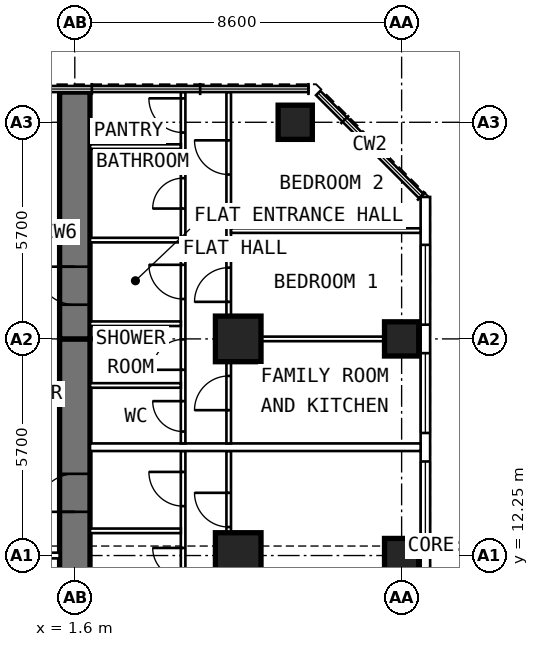
"""IFC4 building model, lengths in metres.
Left out: names, types, materials, properties, quantities, classifications, styles, units other than length and angle.
Written with IfcOpenShell. Run it as: python <this file> out.ifc"""

import sys

from ifc_helpers import new_model, si_unit, direction, frame, frame_2d, origin, origin_2d, place, context, subcontext, project, spatial, rectangle, extrude, element, fill, save


model = new_model("IFC4")
c1 = context("Model", 3, precision=1e-05, world=origin(), true_north=direction((0.0, 1.0)))
c2 = subcontext(c1, "Body", "Model", "MODEL_VIEW")
j1 = project(units=[si_unit("LENGTHUNIT", "METRE"), si_unit("PLANEANGLEUNIT", "RADIAN")], contexts=[c1])
p1 = place(None, origin())
s1 = spatial("IfcSite", under=j1, at=p1, CompositionType="ELEMENT")
p2 = place(p1, origin())
s2 = spatial("IfcBuilding", under=s1, at=p2, CompositionType="ELEMENT")
p3 = place(p2, frame((0.0, 0.0, 172.4)))
s3 = spatial("IfcBuildingStorey", under=s2, at=p3, CompositionType="ELEMENT", Elevation=172.4)
for number, where, z_axis, x_axis in (
    (1, (10.2, 12.25, 0.0), (0.0, 0.0, 1.0), (0.0, 1.0, 0.0)),
    (2, (10.2, 17.95, 0.0), (0.0, 0.0, 1.0), (0.0, 1.0, 0.0)),
    (3, (7.4, 23.65, 0.0), (0.0, 0.0, 1.0), (0.0, 1.0, 0.0)),
):
    element("IfcColumn", number, at=place(p3, frame(where, z_axis=z_axis, x_axis=x_axis)), inside=s3, PredefinedType="COLUMN", context=c2, shape_type="SweptSolid", body=[
        extrude(rectangle(XDim=0.9, YDim=0.9, at=origin_2d()), origin(), (0.0, 0.0, 1.0), 3.6),
    ])
for number, where, z_axis, x_axis in (
    (4, (5.9, 12.25, 0.0), (0.0, 0.0, 1.0), (0.0, 1.0, 0.0)),
    (5, (5.9, 17.95, 0.0), (0.0, 0.0, 1.0), (0.0, 1.0, 0.0)),
):
    element("IfcColumn", number, at=place(p3, frame(where, z_axis=z_axis, x_axis=x_axis)), inside=s3, PredefinedType="COLUMN", context=c2, shape_type="SweptSolid", body=[
        extrude(rectangle(XDim=1.2, YDim=1.2, at=origin_2d()), origin(), (0.0, 0.0, 1.0), 3.6),
    ])
p4 = place(p3, frame((1.6, 9.6, 0.0), z_axis=(0.0, 0.0, 1.0), x_axis=(0.0, 1.0, 0.0)))
e6 = element("IfcWall", 6, at=p4, inside=s3, PredefinedType="SHEAR", context=c2, shape_type="SweptSolid", body=[
    extrude(rectangle(XDim=8.35, YDim=0.8, at=frame_2d((4.175, 0.0))), origin(), (0.0, 0.0, 1.0), 3.6),
])
p5 = place(p4, frame((3.8, 0.0, 0.0)))
e7 = element("IfcOpeningElement", 7, at=p5, cuts=e6, PredefinedType="OPENING", context=c2, shape_type="SweptSolid", body=[
    extrude(rectangle(XDim=1.0, YDim=2.1, at=frame_2d((0.5, 1.05))), frame((0.0, 0.412, 0.0), z_axis=(0.0, -1.0, 0.0), x_axis=(1.0, 0.0, 0.0)), (0.0, 0.0, 1.0), 0.824),
])
p6 = place(p3, frame((1.6, 17.95, 0.0), z_axis=(0.0, 0.0, 1.0), x_axis=(0.0, 1.0, 0.0)))
e8 = element("IfcWall", 8, at=p6, inside=s3, PredefinedType="SHEAR", context=c2, shape_type="SweptSolid", body=[
    extrude(rectangle(XDim=6.495, YDim=0.8, at=frame_2d((3.248, 0.0))), origin(), (0.0, 0.0, 1.0), 3.6),
])
p7 = place(p6, frame((0.9, 0.0, 0.0)))
e9 = element("IfcOpeningElement", 9, at=p7, cuts=e8, PredefinedType="OPENING", context=c2, shape_type="SweptSolid", body=[
    extrude(rectangle(XDim=1.0, YDim=2.1, at=frame_2d((0.5, 1.05))), frame((0.0, 0.412, 0.0), z_axis=(0.0, -1.0, 0.0), x_axis=(1.0, 0.0, 0.0)), (0.0, 0.0, 1.0), 0.824),
])
p8 = place(p3, frame((10.825, 6.409, 0.0), z_axis=(0.0, 0.0, 1.0), x_axis=(0.0, 1.0, 0.0)))
e10 = element("IfcWall", 10, at=p8, inside=s3, PredefinedType="SOLIDWALL", context=c2, shape_type="SweptSolid", body=[
    extrude(rectangle(XDim=15.276, YDim=0.25, at=frame_2d((7.638, 0.0))), origin(), (0.0, 0.0, 1.0), 3.35),
])
p9 = place(p8, frame((0.516, 0.0, 0.8)))
e11 = element("IfcOpeningElement", 11, at=p9, cuts=e10, PredefinedType="OPENING", context=c2, shape_type="SweptSolid", body=[
    extrude(rectangle(XDim=2.1, YDim=1.8, at=frame_2d((1.05, 0.9))), frame((0.0, 0.137, 0.0), z_axis=(0.0, -1.0, 0.0), x_axis=(1.0, 0.0, 0.0)), (0.0, 0.0, 1.0), 0.274),
])
p10 = place(p8, frame((3.366, 0.0, 0.8)))
e12 = element("IfcOpeningElement", 12, at=p10, cuts=e10, PredefinedType="OPENING", context=c2, shape_type="SweptSolid", body=[
    extrude(rectangle(XDim=2.1, YDim=1.8, at=frame_2d((1.05, 0.9))), frame((0.0, 0.137, 0.0), z_axis=(0.0, -1.0, 0.0), x_axis=(1.0, 0.0, 0.0)), (0.0, 0.0, 1.0), 0.274),
])
p11 = place(p8, frame((6.216, 0.0, 0.8)))
e13 = element("IfcOpeningElement", 13, at=p11, cuts=e10, PredefinedType="OPENING", context=c2, shape_type="SweptSolid", body=[
    extrude(rectangle(XDim=2.1, YDim=1.8, at=frame_2d((1.05, 0.9))), frame((0.0, 0.137, 0.0), z_axis=(0.0, -1.0, 0.0), x_axis=(1.0, 0.0, 0.0)), (0.0, 0.0, 1.0), 0.274),
])
p12 = place(p8, frame((9.066, 0.0, 0.8)))
e14 = element("IfcOpeningElement", 14, at=p12, cuts=e10, PredefinedType="OPENING", context=c2, shape_type="SweptSolid", body=[
    extrude(rectangle(XDim=2.1, YDim=1.8, at=frame_2d((1.05, 0.9))), frame((0.0, 0.137, 0.0), z_axis=(0.0, -1.0, 0.0), x_axis=(1.0, 0.0, 0.0)), (0.0, 0.0, 1.0), 0.274),
])
p13 = place(p8, frame((11.916, 0.0, 0.8)))
e15 = element("IfcOpeningElement", 15, at=p13, cuts=e10, PredefinedType="OPENING", context=c2, shape_type="SweptSolid", body=[
    extrude(rectangle(XDim=2.1, YDim=1.8, at=frame_2d((1.05, 0.9))), frame((0.0, 0.137, 0.0), z_axis=(0.0, -1.0, 0.0), x_axis=(1.0, 0.0, 0.0)), (0.0, 0.0, 1.0), 0.274),
])
p14 = place(p3, frame((4.45, 10.05, 0.0), z_axis=(0.0, 0.0, 1.0), x_axis=(0.0, 1.0, 0.0)))
e16 = element("IfcWall", 16, at=p14, inside=s3, PredefinedType="PARTITIONING", context=c2, shape_type="SweptSolid", body=[
    extrude(rectangle(XDim=4.95, YDim=0.12, at=frame_2d((2.475, 0.0))), origin(), (0.0, 0.0, 1.0), 3.35),
])
p15 = place(p14, frame((1.6, 0.0, 0.0)))
e17 = element("IfcOpeningElement", 17, at=p15, cuts=e16, PredefinedType="OPENING", context=c2, shape_type="SweptSolid", body=[
    extrude(rectangle(XDim=0.8, YDim=2.1, at=frame_2d((0.4, 1.05))), frame((0.0, 0.072, 0.0), z_axis=(0.0, -1.0, 0.0), x_axis=(1.0, 0.0, 0.0)), (0.0, 0.0, 1.0), 0.144),
])
p16 = place(p14, frame((3.5, 0.0, 0.0)))
e18 = element("IfcOpeningElement", 18, at=p16, cuts=e16, PredefinedType="OPENING", context=c2, shape_type="SweptSolid", body=[
    extrude(rectangle(XDim=0.9, YDim=2.1, at=frame_2d((0.45, 1.05))), frame((0.0, 0.072, 0.0), z_axis=(0.0, -1.0, 0.0), x_axis=(1.0, 0.0, 0.0)), (0.0, 0.0, 1.0), 0.144),
])
p17 = place(p3, frame((5.65, 9.6, 0.0), z_axis=(0.0, 0.0, 1.0), x_axis=(0.0, 1.0, 0.0)))
e19 = element("IfcWall", 19, at=p17, inside=s3, PredefinedType="PARTITIONING", context=c2, shape_type="SweptSolid", body=[
    extrude(rectangle(XDim=5.4, YDim=0.12, at=frame_2d((2.7, 0.0))), origin(), (0.0, 0.0, 1.0), 3.35),
])
p18 = place(p17, frame((3.4, 0.0, 0.0)))
e20 = element("IfcOpeningElement", 20, at=p18, cuts=e19, PredefinedType="OPENING", context=c2, shape_type="SweptSolid", body=[
    extrude(rectangle(XDim=0.9, YDim=2.1, at=frame_2d((0.45, 1.05))), frame((0.0, 0.072, 0.0), z_axis=(0.0, -1.0, 0.0), x_axis=(1.0, 0.0, 0.0)), (0.0, 0.0, 1.0), 0.144),
])
p19 = place(p3, frame((2.0, 12.9, 0.0), z_axis=(0.0, 0.0, 1.0), x_axis=(1.0, 0.0, 0.0)))
e21 = element("IfcWall", 21, at=p19, inside=s3, PredefinedType="PARTITIONING", context=c2, shape_type="SweptSolid", body=[
    extrude(rectangle(XDim=2.39, YDim=0.12, at=frame_2d((1.195, 0.0))), origin(), (0.0, 0.0, 1.0), 3.35),
])
p20 = place(p3, frame((4.45, 15.2, 0.0), z_axis=(0.0, 0.0, 1.0), x_axis=(0.0, 1.0, 0.0)))
e22 = element("IfcWall", 22, at=p20, inside=s3, PredefinedType="PARTITIONING", context=c2, shape_type="SweptSolid", body=[
    extrude(rectangle(XDim=9.245, YDim=0.12, at=frame_2d((4.623, 0.0))), origin(), (0.0, 0.0, 1.0), 3.35),
])
p21 = place(p20, frame((0.312, 0.0, 0.0)))
e23 = element("IfcOpeningElement", 23, at=p21, cuts=e22, PredefinedType="OPENING", context=c2, shape_type="SweptSolid", body=[
    extrude(rectangle(XDim=0.8, YDim=2.1, at=frame_2d((0.4, 1.05))), frame((0.0, 0.072, 0.0), z_axis=(0.0, -1.0, 0.0), x_axis=(1.0, 0.0, 0.0)), (0.0, 0.0, 1.0), 0.144),
])
p22 = place(p20, frame((1.938, 0.0, 0.0)))
e24 = element("IfcOpeningElement", 24, at=p22, cuts=e22, PredefinedType="OPENING", context=c2, shape_type="SweptSolid", body=[
    extrude(rectangle(XDim=0.8, YDim=2.1, at=frame_2d((0.4, 1.05))), frame((0.0, 0.072, 0.0), z_axis=(0.0, -1.0, 0.0), x_axis=(1.0, 0.0, 0.0)), (0.0, 0.0, 1.0), 0.144),
])
p23 = place(p20, frame((3.8, 0.0, 0.0)))
e25 = element("IfcOpeningElement", 25, at=p23, cuts=e22, PredefinedType="OPENING", context=c2, shape_type="SweptSolid", body=[
    extrude(rectangle(XDim=0.9, YDim=2.1, at=frame_2d((0.45, 1.05))), frame((0.0, 0.072, 0.0), z_axis=(0.0, -1.0, 0.0), x_axis=(1.0, 0.0, 0.0)), (0.0, 0.0, 1.0), 0.144),
])
p24 = place(p20, frame((6.18, 0.0, 0.0)))
e26 = element("IfcOpeningElement", 26, at=p24, cuts=e22, PredefinedType="OPENING", context=c2, shape_type="SweptSolid", body=[
    extrude(rectangle(XDim=0.8, YDim=2.1, at=frame_2d((0.4, 1.05))), frame((0.0, 0.072, 0.0), z_axis=(0.0, -1.0, 0.0), x_axis=(1.0, 0.0, 0.0)), (0.0, 0.0, 1.0), 0.144),
])
p25 = place(p20, frame((8.18, 0.0, 0.0)))
e27 = element("IfcOpeningElement", 27, at=p25, cuts=e22, PredefinedType="OPENING", context=c2, shape_type="SweptSolid", body=[
    extrude(rectangle(XDim=0.9, YDim=2.1, at=frame_2d((0.45, 1.05))), frame((0.0, 0.072, 0.0), z_axis=(0.0, -1.0, 0.0), x_axis=(1.0, 0.0, 0.0)), (0.0, 0.0, 1.0), 0.144),
])
p26 = place(p3, frame((5.65, 15.2, 0.0), z_axis=(0.0, 0.0, 1.0), x_axis=(0.0, 1.0, 0.0)))
e28 = element("IfcWall", 28, at=p26, inside=s3, PredefinedType="PARTITIONING", context=c2, shape_type="SweptSolid", body=[
    extrude(rectangle(XDim=9.245, YDim=0.12, at=frame_2d((4.623, 0.0))), origin(), (0.0, 0.0, 1.0), 3.35),
])
p27 = place(p26, frame((0.875, 0.0, 0.0)))
e29 = element("IfcOpeningElement", 29, at=p27, cuts=e28, PredefinedType="OPENING", context=c2, shape_type="SweptSolid", body=[
    extrude(rectangle(XDim=0.9, YDim=2.1, at=frame_2d((0.45, 1.05))), frame((0.0, 0.072, 0.0), z_axis=(0.0, -1.0, 0.0), x_axis=(1.0, 0.0, 0.0)), (0.0, 0.0, 1.0), 0.144),
])
p28 = place(p26, frame((3.725, 0.0, 0.0)))
e30 = element("IfcOpeningElement", 30, at=p28, cuts=e28, PredefinedType="OPENING", context=c2, shape_type="SweptSolid", body=[
    extrude(rectangle(XDim=0.9, YDim=2.1, at=frame_2d((0.45, 1.05))), frame((0.0, 0.072, 0.0), z_axis=(0.0, -1.0, 0.0), x_axis=(1.0, 0.0, 0.0)), (0.0, 0.0, 1.0), 0.144),
])
p29 = place(p26, frame((7.075, 0.0, 0.0)))
e31 = element("IfcOpeningElement", 31, at=p29, cuts=e28, PredefinedType="OPENING", context=c2, shape_type="SweptSolid", body=[
    extrude(rectangle(XDim=0.9, YDim=2.1, at=frame_2d((0.45, 1.05))), frame((0.0, 0.072, 0.0), z_axis=(0.0, -1.0, 0.0), x_axis=(1.0, 0.0, 0.0)), (0.0, 0.0, 1.0), 0.144),
])
p30 = place(p3, frame((5.71, 17.95, 0.0), z_axis=(0.0, 0.0, 1.0), x_axis=(1.0, 0.0, 0.0)))
e32 = element("IfcWall", 32, at=p30, inside=s3, PredefinedType="PARTITIONING", context=c2, shape_type="SweptSolid", body=[
    extrude(rectangle(XDim=4.99, YDim=0.12, at=frame_2d((2.495, 0.0))), origin(), (0.0, 0.0, 1.0), 2.45),
])
p31 = place(p3, frame((5.71, 20.8, 0.0), z_axis=(0.0, 0.0, 1.0), x_axis=(1.0, 0.0, 0.0)))
e33 = element("IfcWall", 33, at=p31, inside=s3, PredefinedType="PARTITIONING", context=c2, shape_type="SweptSolid", body=[
    extrude(rectangle(XDim=4.99, YDim=0.12, at=frame_2d((2.495, 0.0))), origin(), (0.0, 0.0, 1.0), 3.35),
])
for number, where, z_axis, x_axis in (
    (34, (2.0, 16.725, 0.0), (0.0, 0.0, 1.0), (1.0, 0.0, 0.0)),
    (35, (2.0, 18.35, 0.0), (0.0, 0.0, 1.0), (1.0, 0.0, 0.0)),
    (36, (2.0, 20.55, 0.0), (0.0, 0.0, 1.0), (1.0, 0.0, 0.0)),
    (37, (2.0, 23.01, 0.0), (0.0, 0.0, 1.0), (1.0, 0.0, 0.0)),
):
    element("IfcWall", number, at=place(p3, frame(where, z_axis=z_axis, x_axis=x_axis)), inside=s3, PredefinedType="PARTITIONING", context=c2, shape_type="SweptSolid", body=[
        extrude(rectangle(XDim=2.39, YDim=0.12, at=frame_2d((1.195, 0.0))), origin(), (0.0, 0.0, 1.0), 3.35),
    ])
p32 = place(p3, frame((2.0, 15.1, 0.0), z_axis=(0.0, 0.0, 1.0), x_axis=(1.0, 0.0, 0.0)))
e38 = element("IfcWall", 38, at=p32, inside=s3, PredefinedType="PARTITIONING", context=c2, shape_type="SweptSolid", body=[
    extrude(rectangle(XDim=8.7, YDim=0.2, at=frame_2d((4.35, 0.0))), origin(), (0.0, 0.0, 1.0), 3.35),
])
p33 = place(p3, frame((1.2, 20.75, 0.0), z_axis=(0.0, 0.0, 1.0), x_axis=(-1.0, 0.0, 0.0)))
e39 = element("IfcWall", 39, at=p33, inside=s3, PredefinedType="PARTITIONING", context=c2, shape_type="SweptSolid", body=[
    extrude(rectangle(XDim=2.4, YDim=0.15, at=frame_2d((1.2, 0.0))), origin(), (0.0, 0.0, 1.0), 3.35),
])
p34 = place(p33, frame((0.7, 0.0, 0.0)))
e40 = element("IfcOpeningElement", 40, at=p34, cuts=e39, PredefinedType="OPENING", context=c2, shape_type="SweptSolid", body=[
    extrude(rectangle(XDim=1.0, YDim=2.1, at=frame_2d((0.5, 1.05))), frame((0.0, 0.087, 0.0), z_axis=(0.0, -1.0, 0.0), x_axis=(1.0, 0.0, 0.0)), (0.0, 0.0, 1.0), 0.174),
])
p35 = place(p3, frame((1.2, 12.25, 0.0), z_axis=(0.0, 0.0, 1.0), x_axis=(-1.0, 0.0, 0.0)))
e41 = element("IfcWall", 41, at=p35, inside=s3, PredefinedType="PARTITIONING", context=c2, shape_type="SweptSolid", body=[
    extrude(rectangle(XDim=2.4, YDim=0.15, at=frame_2d((1.2, 0.0))), origin(), (0.0, 0.0, 1.0), 3.35),
])
p36 = place(p35, frame((0.7, 0.0, 0.0)))
e42 = element("IfcOpeningElement", 42, at=p36, cuts=e41, PredefinedType="OPENING", context=c2, shape_type="SweptSolid", body=[
    extrude(rectangle(XDim=1.0, YDim=2.1, at=frame_2d((0.5, 1.05))), frame((0.0, 0.087, 0.0), z_axis=(0.0, -1.0, 0.0), x_axis=(1.0, 0.0, 0.0)), (0.0, 0.0, 1.0), 0.174),
])
p37 = place(p11, origin())
e43 = element("IfcWindow", 43, at=p37, inside=s3, PartitioningType="SINGLE_PANEL", PredefinedType="WINDOW", context=c2, shape_type="SweptSolid", body=[
    extrude(rectangle(XDim=2.1, YDim=1.8, at=frame_2d((1.05, 0.9))), frame((0.0, 0.03, 0.0), z_axis=(0.0, -1.0, 0.0), x_axis=(1.0, 0.0, 0.0)), (0.0, 0.0, 1.0), 0.06),
])
fill(e13, e43)
p38 = place(p12, origin())
e44 = element("IfcWindow", 44, at=p38, inside=s3, PartitioningType="SINGLE_PANEL", PredefinedType="WINDOW", context=c2, shape_type="SweptSolid", body=[
    extrude(rectangle(XDim=2.1, YDim=1.8, at=frame_2d((1.05, 0.9))), frame((0.0, 0.03, 0.0), z_axis=(0.0, -1.0, 0.0), x_axis=(1.0, 0.0, 0.0)), (0.0, 0.0, 1.0), 0.06),
])
fill(e14, e44)
p39 = place(p13, origin())
e45 = element("IfcWindow", 45, at=p39, inside=s3, PartitioningType="SINGLE_PANEL", PredefinedType="WINDOW", context=c2, shape_type="SweptSolid", body=[
    extrude(rectangle(XDim=2.1, YDim=1.8, at=frame_2d((1.05, 0.9))), frame((0.0, 0.03, 0.0), z_axis=(0.0, -1.0, 0.0), x_axis=(1.0, 0.0, 0.0)), (0.0, 0.0, 1.0), 0.06),
])
fill(e15, e45)
p40 = place(p5, origin())
e46 = element("IfcDoor", 46, at=p40, inside=s3, OperationType="SINGLE_SWING_LEFT", PredefinedType="DOOR", context=c2, shape_type="SweptSolid", body=[
    extrude(rectangle(XDim=1.0, YDim=2.1, at=frame_2d((0.5, 1.05))), frame((0.0, 0.15, 0.0), z_axis=(0.0, -1.0, 0.0), x_axis=(1.0, 0.0, 0.0)), (0.0, 0.0, 1.0), 0.3),
])
fill(e7, e46)
p41 = place(p18, origin())
e47 = element("IfcDoor", 47, at=p41, inside=s3, OperationType="SINGLE_SWING_RIGHT", PredefinedType="DOOR", context=c2, shape_type="SweptSolid", body=[
    extrude(rectangle(XDim=0.9, YDim=2.1, at=frame_2d((0.45, 1.05))), frame((0.0, 0.025, 0.0), z_axis=(0.0, -1.0, 0.0), x_axis=(1.0, 0.0, 0.0)), (0.0, 0.0, 1.0), 0.05),
])
fill(e20, e47)
p42 = place(p15, origin())
e48 = element("IfcDoor", 48, at=p42, inside=s3, OperationType="SINGLE_SWING_RIGHT", PredefinedType="DOOR", context=c2, shape_type="SweptSolid", body=[
    extrude(rectangle(XDim=0.8, YDim=2.1, at=frame_2d((0.4, 1.05))), frame((0.0, 0.025, 0.0), z_axis=(0.0, -1.0, 0.0), x_axis=(1.0, 0.0, 0.0)), (0.0, 0.0, 1.0), 0.05),
])
fill(e17, e48)
p43 = place(p16, origin())
e49 = element("IfcDoor", 49, at=p43, inside=s3, OperationType="SINGLE_SWING_RIGHT", PredefinedType="DOOR", context=c2, shape_type="SweptSolid", body=[
    extrude(rectangle(XDim=0.9, YDim=2.1, at=frame_2d((0.45, 1.05))), frame((0.0, 0.025, 0.0), z_axis=(0.0, -1.0, 0.0), x_axis=(1.0, 0.0, 0.0)), (0.0, 0.0, 1.0), 0.05),
])
fill(e18, e49)
p44 = place(p7, origin())
e50 = element("IfcDoor", 50, at=p44, inside=s3, OperationType="SINGLE_SWING_RIGHT", PredefinedType="DOOR", context=c2, shape_type="SweptSolid", body=[
    extrude(rectangle(XDim=1.0, YDim=2.1, at=frame_2d((0.5, 1.05))), frame((0.0, 0.15, 0.0), z_axis=(0.0, -1.0, 0.0), x_axis=(1.0, 0.0, 0.0)), (0.0, 0.0, 1.0), 0.3),
])
fill(e9, e50)
p45 = place(p27, origin())
e51 = element("IfcDoor", 51, at=p45, inside=s3, OperationType="SINGLE_SWING_LEFT", PredefinedType="DOOR", context=c2, shape_type="SweptSolid", body=[
    extrude(rectangle(XDim=0.9, YDim=2.1, at=frame_2d((0.45, 1.05))), frame((0.0, 0.025, 0.0), z_axis=(0.0, -1.0, 0.0), x_axis=(1.0, 0.0, 0.0)), (0.0, 0.0, 1.0), 0.05),
])
fill(e29, e51)
p46 = place(p28, origin())
e52 = element("IfcDoor", 52, at=p46, inside=s3, OperationType="SINGLE_SWING_LEFT", PredefinedType="DOOR", context=c2, shape_type="SweptSolid", body=[
    extrude(rectangle(XDim=0.9, YDim=2.1, at=frame_2d((0.45, 1.05))), frame((0.0, 0.025, 0.0), z_axis=(0.0, -1.0, 0.0), x_axis=(1.0, 0.0, 0.0)), (0.0, 0.0, 1.0), 0.05),
])
fill(e30, e52)
p47 = place(p29, origin())
e53 = element("IfcDoor", 53, at=p47, inside=s3, OperationType="SINGLE_SWING_RIGHT", PredefinedType="DOOR", context=c2, shape_type="SweptSolid", body=[
    extrude(rectangle(XDim=0.9, YDim=2.1, at=frame_2d((0.45, 1.05))), frame((0.0, 0.025, 0.0), z_axis=(0.0, -1.0, 0.0), x_axis=(1.0, 0.0, 0.0)), (0.0, 0.0, 1.0), 0.05),
])
fill(e31, e53)
p48 = place(p21, origin())
e54 = element("IfcDoor", 54, at=p48, inside=s3, OperationType="SINGLE_SWING_RIGHT", PredefinedType="DOOR", context=c2, shape_type="SweptSolid", body=[
    extrude(rectangle(XDim=0.8, YDim=2.1, at=frame_2d((0.4, 1.05))), frame((0.0, 0.025, 0.0), z_axis=(0.0, -1.0, 0.0), x_axis=(1.0, 0.0, 0.0)), (0.0, 0.0, 1.0), 0.05),
])
fill(e23, e54)
p49 = place(p22, origin())
e55 = element("IfcDoor", 55, at=p49, inside=s3, OperationType="SINGLE_SWING_LEFT", PredefinedType="DOOR", context=c2, shape_type="SweptSolid", body=[
    extrude(rectangle(XDim=0.8, YDim=2.1, at=frame_2d((0.4, 1.05))), frame((0.0, 0.025, 0.0), z_axis=(0.0, -1.0, 0.0), x_axis=(1.0, 0.0, 0.0)), (0.0, 0.0, 1.0), 0.05),
])
fill(e24, e55)
p50 = place(p23, origin())
e56 = element("IfcDoor", 56, at=p50, inside=s3, OperationType="SINGLE_SWING_RIGHT", PredefinedType="DOOR", context=c2, shape_type="SweptSolid", body=[
    extrude(rectangle(XDim=0.9, YDim=2.1, at=frame_2d((0.45, 1.05))), frame((0.0, 0.025, 0.0), z_axis=(0.0, -1.0, 0.0), x_axis=(1.0, 0.0, 0.0)), (0.0, 0.0, 1.0), 0.05),
])
fill(e25, e56)
p51 = place(p24, origin())
e57 = element("IfcDoor", 57, at=p51, inside=s3, OperationType="SINGLE_SWING_LEFT", PredefinedType="DOOR", context=c2, shape_type="SweptSolid", body=[
    extrude(rectangle(XDim=0.8, YDim=2.1, at=frame_2d((0.4, 1.05))), frame((0.0, 0.025, 0.0), z_axis=(0.0, -1.0, 0.0), x_axis=(1.0, 0.0, 0.0)), (0.0, 0.0, 1.0), 0.05),
])
fill(e26, e57)
p52 = place(p25, origin())
e58 = element("IfcDoor", 58, at=p52, inside=s3, OperationType="SINGLE_SWING_RIGHT", PredefinedType="DOOR", context=c2, shape_type="SweptSolid", body=[
    extrude(rectangle(XDim=0.9, YDim=2.1, at=frame_2d((0.45, 1.05))), frame((0.0, 0.025, 0.0), z_axis=(0.0, -1.0, 0.0), x_axis=(1.0, 0.0, 0.0)), (0.0, 0.0, 1.0), 0.05),
])
fill(e27, e58)
save(model, sys.argv[1])
